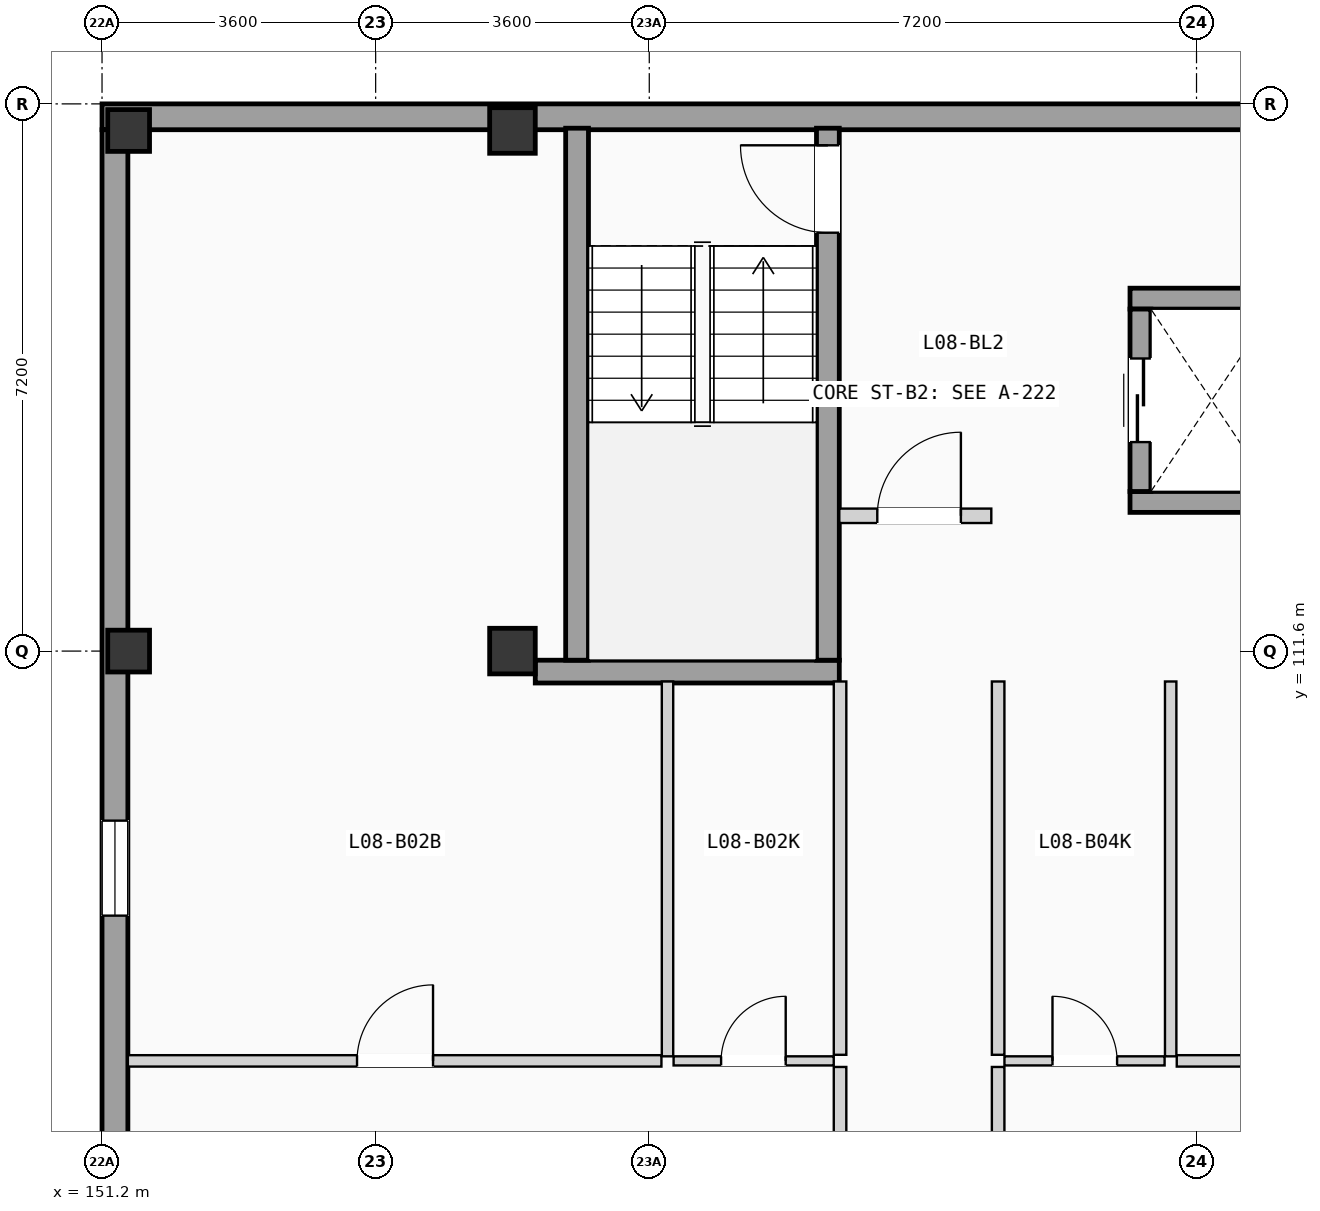
"""IFC4 building model, lengths in metres.
Left out: names, types, materials, properties, quantities, classifications, styles, units other than length and angle.
Written with IfcOpenShell. Run it as: python <this file> out.ifc"""

import sys

from ifc_helpers import new_model, si_unit, direction, frame, frame_2d, origin, origin_2d, place, context, subcontext, project, spatial, rectangle, extrude, element, fill, save


model = new_model("IFC4")
c1 = context("Model", 3, precision=1e-05, world=origin(), true_north=direction((0.0, 1.0)))
c2 = subcontext(c1, "Body", "Model", "MODEL_VIEW")
j1 = project(units=[si_unit("LENGTHUNIT", "METRE"), si_unit("PLANEANGLEUNIT", "RADIAN")], contexts=[c1])
p1 = place(None, origin())
s1 = spatial("IfcSite", under=j1, at=p1, CompositionType="ELEMENT")
p2 = place(p1, origin())
s2 = spatial("IfcBuilding", under=s1, at=p2, CompositionType="ELEMENT")
p3 = place(p2, frame((0.0, 0.0, 27.825)))
s3 = spatial("IfcBuildingStorey", under=s2, at=p3, CompositionType="ELEMENT", Elevation=27.825)
for number, where, z_axis, x_axis in (
    (1, (151.55, 111.6, 0.0), (0.0, 0.0, 1.0), (1.0, 0.0, 0.0)),
    (2, (151.55, 118.45, 0.0), (0.0, 0.0, 1.0), (1.0, 0.0, 0.0)),
):
    element("IfcColumn", number, at=place(p3, frame(where, z_axis=z_axis, x_axis=x_axis)), inside=s3, PredefinedType="COLUMN", context=c2, shape_type="SweptSolid", body=[
        extrude(rectangle(XDim=0.55, YDim=0.55, at=origin_2d()), origin(), (0.0, 0.0, 1.0), 3.15),
    ])
for number, where, z_axis, x_axis in (
    (3, (156.6, 111.6, 0.0), (0.0, 0.0, 1.0), (1.0, 0.0, 0.0)),
    (4, (156.6, 118.45, 0.0), (0.0, 0.0, 1.0), (1.0, 0.0, 0.0)),
):
    element("IfcColumn", number, at=place(p3, frame(where, z_axis=z_axis, x_axis=x_axis)), inside=s3, PredefinedType="COLUMN", context=c2, shape_type="SweptSolid", body=[
        extrude(rectangle(XDim=0.6, YDim=0.6, at=origin_2d()), origin(), (0.0, 0.0, 1.0), 3.15),
    ])
p4 = place(p3, frame((151.2, 118.63, 0.0), z_axis=(0.0, 0.0, 1.0), x_axis=(1.0, 0.0, 0.0)))
e5 = element("IfcWall", 5, at=p4, inside=s3, PredefinedType="SOLIDWALL", context=c2, shape_type="SweptSolid", body=[
    extrude(rectangle(XDim=21.6, YDim=0.34, at=frame_2d((10.8, 0.0))), origin(), (0.0, 0.0, 1.0), 2.89),
])
p5 = place(p3, frame((151.37, 68.74, 0.0), z_axis=(0.0, 0.0, 1.0), x_axis=(0.0, 1.0, 0.0)))
e6 = element("IfcWall", 6, at=p5, inside=s3, PredefinedType="SOLIDWALL", context=c2, shape_type="SweptSolid", body=[
    extrude(rectangle(XDim=49.72, YDim=0.34, at=frame_2d((24.86, 0.0))), origin(), (0.0, 0.0, 1.0), 2.89),
])
p6 = place(p5, frame((16.707, 0.0, 0.855)))
e7 = element("IfcOpeningElement", 7, at=p6, cuts=e6, PredefinedType="OPENING", context=c2, shape_type="SweptSolid", body=[
    extrude(rectangle(XDim=1.15, YDim=1.35, at=frame_2d((0.575, 0.675))), frame((0.0, 0.18, 0.0), z_axis=(0.0, -1.0, 0.0), x_axis=(1.0, 0.0, 0.0)), (0.0, 0.0, 1.0), 0.36),
])
p7 = place(p5, frame((9.578, 0.0, 0.705)))
e8 = element("IfcOpeningElement", 8, at=p7, cuts=e6, PredefinedType="OPENING", context=c2, shape_type="SweptSolid", body=[
    extrude(rectangle(XDim=1.15, YDim=1.5, at=frame_2d((0.575, 0.75))), frame((0.0, 0.18, 0.0), z_axis=(0.0, -1.0, 0.0), x_axis=(1.0, 0.0, 0.0)), (0.0, 0.0, 1.0), 0.36),
])
p8 = place(p5, frame((23.279, 0.0, 0.555)))
e9 = element("IfcOpeningElement", 9, at=p8, cuts=e6, PredefinedType="OPENING", context=c2, shape_type="SweptSolid", body=[
    extrude(rectangle(XDim=1.15, YDim=1.65, at=frame_2d((0.575, 0.825))), frame((0.0, 0.18, 0.0), z_axis=(0.0, -1.0, 0.0), x_axis=(1.0, 0.0, 0.0)), (0.0, 0.0, 1.0), 0.36),
])
p9 = place(p5, frame((32.935, 0.0, 0.85)))
e10 = element("IfcOpeningElement", 10, at=p9, cuts=e6, PredefinedType="OPENING", context=c2, shape_type="SweptSolid", body=[
    extrude(rectangle(XDim=0.95, YDim=1.2, at=frame_2d((0.475, 0.6))), frame((0.0, 0.18, 0.0), z_axis=(0.0, -1.0, 0.0), x_axis=(1.0, 0.0, 0.0)), (0.0, 0.0, 1.0), 0.36),
])
p10 = place(p5, frame((29.375, 0.0, 0.9)))
e11 = element("IfcOpeningElement", 11, at=p10, cuts=e6, PredefinedType="OPENING", context=c2, shape_type="SweptSolid", body=[
    extrude(rectangle(XDim=1.25, YDim=1.2, at=frame_2d((0.625, 0.6))), frame((0.0, 0.18, 0.0), z_axis=(0.0, -1.0, 0.0), x_axis=(1.0, 0.0, 0.0)), (0.0, 0.0, 1.0), 0.36),
])
p11 = place(p5, frame((39.379, 0.0, 0.855)))
e12 = element("IfcOpeningElement", 12, at=p11, cuts=e6, PredefinedType="OPENING", context=c2, shape_type="SweptSolid", body=[
    extrude(rectangle(XDim=1.25, YDim=1.35, at=frame_2d((0.625, 0.675))), frame((0.0, 0.18, 0.0), z_axis=(0.0, -1.0, 0.0), x_axis=(1.0, 0.0, 0.0)), (0.0, 0.0, 1.0), 0.36),
])
p12 = place(p3, frame((156.9, 111.33, 0.0), z_axis=(0.0, 0.0, 1.0), x_axis=(1.0, 0.0, 0.0)))
e13 = element("IfcWall", 13, at=p12, inside=s3, PredefinedType="SHEAR", context=c2, shape_type="SweptSolid", body=[
    extrude(rectangle(XDim=4.0, YDim=0.3, at=frame_2d((2.0, 0.0))), origin(), (0.0, 0.0, 1.0), 2.89),
])
p13 = place(p3, frame((157.45, 111.48, 0.0), z_axis=(0.0, 0.0, 1.0), x_axis=(0.0, 1.0, 0.0)))
e14 = element("IfcWall", 14, at=p13, inside=s3, PredefinedType="SHEAR", context=c2, shape_type="SweptSolid", body=[
    extrude(rectangle(XDim=7.0, YDim=0.3, at=frame_2d((3.5, 0.0))), origin(), (0.0, 0.0, 1.0), 2.89),
])
p14 = place(p3, frame((160.75, 111.48, 0.0), z_axis=(0.0, 0.0, 1.0), x_axis=(0.0, 1.0, 0.0)))
e15 = element("IfcWall", 15, at=p14, inside=s3, PredefinedType="SHEAR", context=c2, shape_type="SweptSolid", body=[
    extrude(rectangle(XDim=7.0, YDim=0.3, at=frame_2d((3.5, 0.0))), origin(), (0.0, 0.0, 1.0), 2.89),
])
p15 = place(p14, frame((5.625, 0.0, 0.0)))
e16 = element("IfcOpeningElement", 16, at=p15, cuts=e15, PredefinedType="OPENING", context=c2, shape_type="SweptSolid", body=[
    extrude(rectangle(XDim=1.15, YDim=2.12, at=frame_2d((0.575, 1.06))), frame((0.0, 0.16, 0.0), z_axis=(0.0, -1.0, 0.0), x_axis=(1.0, 0.0, 0.0)), (0.0, 0.0, 1.0), 0.32),
])
for number, where, z_axis, x_axis in (
    (17, (164.725, 113.562, 0.0), (0.0, 0.0, 1.0), (1.0, 0.0, 0.0)),
    (18, (164.725, 116.238, 0.0), (0.0, 0.0, 1.0), (1.0, 0.0, 0.0)),
):
    element("IfcWall", number, at=place(p3, frame(where, z_axis=z_axis, x_axis=x_axis)), inside=s3, PredefinedType="SHEAR", context=c2, shape_type="SweptSolid", body=[
        extrude(rectangle(XDim=2.15, YDim=0.275, at=frame_2d((1.075, 0.0))), origin(), (0.0, 0.0, 1.0), 2.89),
    ])
p16 = place(p3, frame((164.863, 113.7, 0.0), z_axis=(0.0, 0.0, 1.0), x_axis=(0.0, 1.0, 0.0)))
e19 = element("IfcWall", 19, at=p16, inside=s3, PredefinedType="SHEAR", context=c2, shape_type="SweptSolid", body=[
    extrude(rectangle(XDim=2.4, YDim=0.275, at=frame_2d((1.2, 0.0))), origin(), (0.0, 0.0, 1.0), 2.89),
])
p17 = place(p16, frame((0.65, 0.0, 0.0)))
e20 = element("IfcOpeningElement", 20, at=p17, cuts=e19, PredefinedType="OPENING", context=c2, shape_type="SweptSolid", body=[
    extrude(rectangle(XDim=1.1, YDim=2.15, at=frame_2d((0.55, 1.075))), frame((0.0, 0.147, 0.0), z_axis=(0.0, -1.0, 0.0), x_axis=(1.0, 0.0, 0.0)), (0.0, 0.0, 1.0), 0.295),
])
p18 = place(p3, frame((160.9, 113.38, 0.0), z_axis=(0.0, 0.0, 1.0), x_axis=(1.0, 0.0, 0.0)))
e21 = element("IfcWall", 21, at=p18, inside=s3, PredefinedType="PARTITIONING", context=c2, shape_type="SweptSolid", body=[
    extrude(rectangle(XDim=2.0, YDim=0.19, at=frame_2d((1.0, 0.0))), origin(), (0.0, 0.0, 1.0), 2.87),
])
p19 = place(p18, frame((0.5, 0.0, 0.0)))
e22 = element("IfcOpeningElement", 22, at=p19, cuts=e21, PredefinedType="OPENING", context=c2, shape_type="SweptSolid", body=[
    extrude(rectangle(XDim=1.1, YDim=2.12, at=frame_2d((0.55, 1.06))), frame((0.0, 0.105, 0.0), z_axis=(0.0, -1.0, 0.0), x_axis=(1.0, 0.0, 0.0)), (0.0, 0.0, 1.0), 0.21),
])
p20 = place(p3, frame((160.91, 100.17, 0.0), z_axis=(0.0, 0.0, 1.0), x_axis=(0.0, 1.0, 0.0)))
e23 = element("IfcWall", 23, at=p20, inside=s3, PredefinedType="PARTITIONING", context=c2, shape_type="SweptSolid", body=[
    extrude(rectangle(XDim=5.958, YDim=0.165, at=frame_2d((2.979, 0.0))), origin(), (0.0, 0.0, 1.0), 2.87),
])
p21 = place(p20, frame((2.474, 0.0, 0.0)))
e24 = element("IfcOpeningElement", 24, at=p21, cuts=e23, PredefinedType="OPENING", context=c2, shape_type="SweptSolid", body=[
    extrude(rectangle(XDim=1.01, YDim=2.11, at=frame_2d((0.505, 1.055))), frame((0.0, 0.093, 0.0), z_axis=(0.0, -1.0, 0.0), x_axis=(1.0, 0.0, 0.0)), (0.0, 0.0, 1.0), 0.185),
])
p22 = place(p3, frame((160.91, 106.288, 0.0), z_axis=(0.0, 0.0, 1.0), x_axis=(0.0, 1.0, 0.0)))
e25 = element("IfcWall", 25, at=p22, inside=s3, PredefinedType="PARTITIONING", context=c2, shape_type="SweptSolid", body=[
    extrude(rectangle(XDim=4.912, YDim=0.165, at=frame_2d((2.456, 0.0))), origin(), (0.0, 0.0, 1.0), 2.87),
])
p23 = place(p3, frame((162.99, 100.17, 0.0), z_axis=(0.0, 0.0, 1.0), x_axis=(0.0, 1.0, 0.0)))
e26 = element("IfcWall", 26, at=p23, inside=s3, PredefinedType="PARTITIONING", context=c2, shape_type="SweptSolid", body=[
    extrude(rectangle(XDim=5.958, YDim=0.165, at=frame_2d((2.979, 0.0))), origin(), (0.0, 0.0, 1.0), 2.87),
])
p24 = place(p23, frame((2.474, 0.0, 0.0)))
e27 = element("IfcOpeningElement", 27, at=p24, cuts=e26, PredefinedType="OPENING", context=c2, shape_type="SweptSolid", body=[
    extrude(rectangle(XDim=1.01, YDim=2.11, at=frame_2d((0.505, 1.055))), frame((0.0, 0.093, 0.0), z_axis=(0.0, -1.0, 0.0), x_axis=(1.0, 0.0, 0.0)), (0.0, 0.0, 1.0), 0.185),
])
p25 = place(p3, frame((162.99, 106.288, 0.0), z_axis=(0.0, 0.0, 1.0), x_axis=(0.0, 1.0, 0.0)))
e28 = element("IfcWall", 28, at=p25, inside=s3, PredefinedType="PARTITIONING", context=c2, shape_type="SweptSolid", body=[
    extrude(rectangle(XDim=4.912, YDim=0.165, at=frame_2d((2.456, 0.0))), origin(), (0.0, 0.0, 1.0), 2.87),
])
p26 = place(p3, frame((158.72, 106.208, 0.0), z_axis=(0.0, 0.0, 1.0), x_axis=(1.0, 0.0, 0.0)))
e29 = element("IfcWall", 29, at=p26, inside=s3, PredefinedType="PARTITIONING", context=c2, shape_type="SweptSolid", body=[
    extrude(rectangle(XDim=2.107, YDim=0.12, at=frame_2d((1.053, 0.0))), origin(), (0.0, 0.0, 1.0), 2.87),
])
p27 = place(p26, frame((0.625, 0.0, 0.0)))
e30 = element("IfcOpeningElement", 30, at=p27, cuts=e29, PredefinedType="OPENING", context=c2, shape_type="SweptSolid", body=[
    extrude(rectangle(XDim=0.85, YDim=2.01, at=frame_2d((0.425, 1.005))), frame((0.0, 0.07, 0.0), z_axis=(0.0, -1.0, 0.0), x_axis=(1.0, 0.0, 0.0)), (0.0, 0.0, 1.0), 0.14),
])
p28 = place(p3, frame((151.54, 106.208, 0.0), z_axis=(0.0, 0.0, 1.0), x_axis=(1.0, 0.0, 0.0)))
e31 = element("IfcWall", 31, at=p28, inside=s3, PredefinedType="PARTITIONING", context=c2, shape_type="SweptSolid", body=[
    extrude(rectangle(XDim=7.02, YDim=0.15, at=frame_2d((3.51, 0.0))), origin(), (0.0, 0.0, 1.0), 2.87),
])
p29 = place(p28, frame((3.015, 0.0, 0.0)))
e32 = element("IfcOpeningElement", 32, at=p29, cuts=e31, PredefinedType="OPENING", context=c2, shape_type="SweptSolid", body=[
    extrude(rectangle(XDim=1.0, YDim=2.06, at=frame_2d((0.5, 1.03))), frame((0.0, 0.085, 0.0), z_axis=(0.0, -1.0, 0.0), x_axis=(1.0, 0.0, 0.0)), (0.0, 0.0, 1.0), 0.17),
])
p30 = place(p3, frame((158.64, 106.268, 0.0), z_axis=(0.0, 0.0, 1.0), x_axis=(0.0, 1.0, 0.0)))
e33 = element("IfcWall", 33, at=p30, inside=s3, PredefinedType="PARTITIONING", context=c2, shape_type="SweptSolid", body=[
    extrude(rectangle(XDim=4.932, YDim=0.15, at=frame_2d((2.466, 0.0))), origin(), (0.0, 0.0, 1.0), 2.87),
])
p31 = place(p3, frame((163.073, 106.208, 0.0), z_axis=(0.0, 0.0, 1.0), x_axis=(1.0, 0.0, 0.0)))
e34 = element("IfcWall", 34, at=p31, inside=s3, PredefinedType="PARTITIONING", context=c2, shape_type="SweptSolid", body=[
    extrude(rectangle(XDim=2.107, YDim=0.12, at=frame_2d((1.053, 0.0))), origin(), (0.0, 0.0, 1.0), 2.87),
])
p32 = place(p31, frame((0.632, 0.0, 0.0)))
e35 = element("IfcOpeningElement", 35, at=p32, cuts=e34, PredefinedType="OPENING", context=c2, shape_type="SweptSolid", body=[
    extrude(rectangle(XDim=0.85, YDim=2.01, at=frame_2d((0.425, 1.005))), frame((0.0, 0.07, 0.0), z_axis=(0.0, -1.0, 0.0), x_axis=(1.0, 0.0, 0.0)), (0.0, 0.0, 1.0), 0.14),
])
p33 = place(p3, frame((165.34, 106.208, 0.0), z_axis=(0.0, 0.0, 1.0), x_axis=(1.0, 0.0, 0.0)))
e36 = element("IfcWall", 36, at=p33, inside=s3, PredefinedType="PARTITIONING", context=c2, shape_type="SweptSolid", body=[
    extrude(rectangle(XDim=7.12, YDim=0.15, at=frame_2d((3.56, 0.0))), origin(), (0.0, 0.0, 1.0), 2.87),
])
p34 = place(p33, frame((3.085, 0.0, 0.0)))
e37 = element("IfcOpeningElement", 37, at=p34, cuts=e36, PredefinedType="OPENING", context=c2, shape_type="SweptSolid", body=[
    extrude(rectangle(XDim=0.94, YDim=2.06, at=frame_2d((0.47, 1.03))), frame((0.0, 0.085, 0.0), z_axis=(0.0, -1.0, 0.0), x_axis=(1.0, 0.0, 0.0)), (0.0, 0.0, 1.0), 0.17),
])
p35 = place(p3, frame((165.26, 106.268, 0.0), z_axis=(0.0, 0.0, 1.0), x_axis=(0.0, 1.0, 0.0)))
e38 = element("IfcWall", 38, at=p35, inside=s3, PredefinedType="PARTITIONING", context=c2, shape_type="SweptSolid", body=[
    extrude(rectangle(XDim=4.932, YDim=0.15, at=frame_2d((2.466, 0.0))), origin(), (0.0, 0.0, 1.0), 2.87),
])
p36 = place(p11, origin())
e39 = element("IfcWindow", 39, at=p36, inside=s3, PartitioningType="SINGLE_PANEL", PredefinedType="WINDOW", context=c2, shape_type="SweptSolid", body=[
    extrude(rectangle(XDim=1.25, YDim=1.35, at=frame_2d((0.625, 0.675))), frame((0.0, 0.03, 0.0), z_axis=(0.0, -1.0, 0.0), x_axis=(1.0, 0.0, 0.0)), (0.0, 0.0, 1.0), 0.06),
])
fill(e12, e39)
p37 = place(p15, origin())
e40 = element("IfcDoor", 40, at=p37, inside=s3, OperationType="SINGLE_SWING_RIGHT", PredefinedType="DOOR", context=c2, shape_type="SweptSolid", body=[
    extrude(rectangle(XDim=1.15, YDim=2.12, at=frame_2d((0.575, 1.06))), frame((0.0, 0.025, 0.0), z_axis=(0.0, -1.0, 0.0), x_axis=(1.0, 0.0, 0.0)), (0.0, 0.0, 1.0), 0.05),
])
fill(e16, e40)
p38 = place(p17, origin())
e41 = element("IfcDoor", 41, at=p38, inside=s3, OperationType="SLIDING_TO_LEFT", PredefinedType="DOOR", context=c2, shape_type="SweptSolid", body=[
    extrude(rectangle(XDim=1.1, YDim=2.15, at=frame_2d((0.55, 1.075))), frame((0.0, 0.025, 0.0), z_axis=(0.0, -1.0, 0.0), x_axis=(1.0, 0.0, 0.0)), (0.0, 0.0, 1.0), 0.05),
])
fill(e20, e41)
p39 = place(p19, origin())
e42 = element("IfcDoor", 42, at=p39, inside=s3, OperationType="SINGLE_SWING_RIGHT", PredefinedType="DOOR", context=c2, shape_type="SweptSolid", body=[
    extrude(rectangle(XDim=1.1, YDim=2.12, at=frame_2d((0.55, 1.06))), frame((0.0, 0.025, 0.0), z_axis=(0.0, -1.0, 0.0), x_axis=(1.0, 0.0, 0.0)), (0.0, 0.0, 1.0), 0.05),
])
fill(e22, e42)
p40 = place(p27, origin())
e43 = element("IfcDoor", 43, at=p40, inside=s3, OperationType="SINGLE_SWING_RIGHT", PredefinedType="DOOR", context=c2, shape_type="SweptSolid", body=[
    extrude(rectangle(XDim=0.85, YDim=2.01, at=frame_2d((0.425, 1.005))), frame((0.0, 0.025, 0.0), z_axis=(0.0, -1.0, 0.0), x_axis=(1.0, 0.0, 0.0)), (0.0, 0.0, 1.0), 0.05),
])
fill(e30, e43)
p41 = place(p29, origin())
e44 = element("IfcDoor", 44, at=p41, inside=s3, OperationType="SINGLE_SWING_RIGHT", PredefinedType="DOOR", context=c2, shape_type="SweptSolid", body=[
    extrude(rectangle(XDim=1.0, YDim=2.06, at=frame_2d((0.5, 1.03))), frame((0.0, 0.025, 0.0), z_axis=(0.0, -1.0, 0.0), x_axis=(1.0, 0.0, 0.0)), (0.0, 0.0, 1.0), 0.05),
])
fill(e32, e44)
p42 = place(p32, origin())
e45 = element("IfcDoor", 45, at=p42, inside=s3, OperationType="SINGLE_SWING_LEFT", PredefinedType="DOOR", context=c2, shape_type="SweptSolid", body=[
    extrude(rectangle(XDim=0.85, YDim=2.01, at=frame_2d((0.425, 1.005))), frame((0.0, 0.025, 0.0), z_axis=(0.0, -1.0, 0.0), x_axis=(1.0, 0.0, 0.0)), (0.0, 0.0, 1.0), 0.05),
])
fill(e35, e45)
save(model, sys.argv[1])
